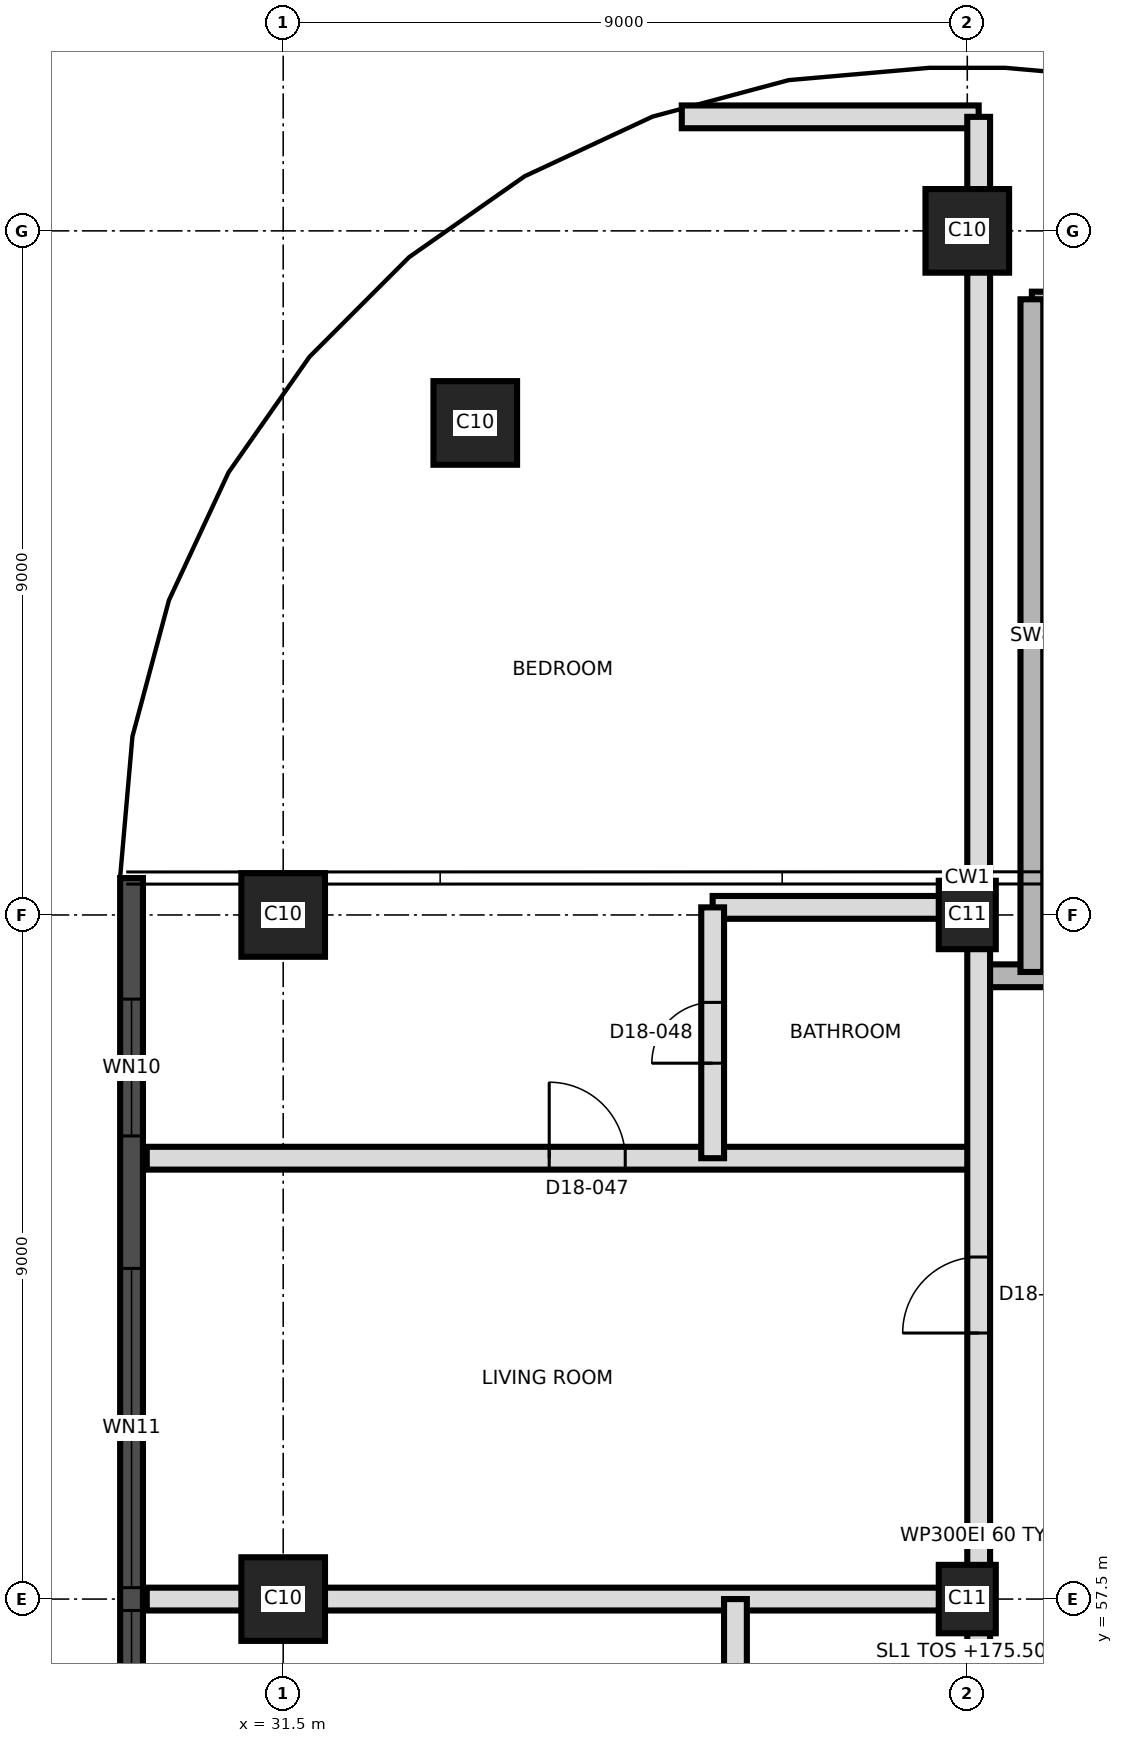
"""IFC4 building model, lengths in metres.
Left out: names, types, materials, properties, quantities, classifications, styles, units other than length and angle.
Written with IfcOpenShell. Run it as: python <this file> out.ifc"""

import sys

from ifc_helpers import new_model, si_unit, direction, frame, frame_2d, origin, origin_2d, place, context, subcontext, project, spatial, rectangle, extrude, element, fill, save


model = new_model("IFC4")
c1 = context("Model", 3, precision=1e-05, world=origin(), true_north=direction((0.0, 1.0)))
c2 = subcontext(c1, "Body", "Model", "MODEL_VIEW")
j1 = project(units=[si_unit("LENGTHUNIT", "METRE"), si_unit("PLANEANGLEUNIT", "RADIAN")], contexts=[c1])
p1 = place(None, origin())
s1 = spatial("IfcSite", under=j1, at=p1, CompositionType="ELEMENT")
p2 = place(p1, origin())
s2 = spatial("IfcBuilding", under=s1, at=p2, CompositionType="ELEMENT")
p3 = place(p2, frame((0.0, 0.0, 175.5)))
s3 = spatial("IfcBuildingStorey", under=s2, at=p3, CompositionType="ELEMENT", Elevation=175.5)
p4 = place(p3, frame((31.5, 57.5, 0.0), z_axis=(0.0, 0.0, 1.0), x_axis=(1.0, 0.0, 0.0)))
e1 = element("IfcColumn", 1, at=p4, inside=s3, PredefinedType="COLUMN", context=c2, shape_type="SweptSolid", body=[
    extrude(rectangle(XDim=1.1, YDim=1.1, at=origin_2d()), origin(), (0.0, 0.0, 1.0), 3.7),
])
p5 = place(p3, frame((40.5, 57.5, 0.0), z_axis=(0.0, 0.0, 1.0), x_axis=(0.0, 1.0, 0.0)))
e2 = element("IfcColumn", 2, at=p5, inside=s3, PredefinedType="COLUMN", context=c2, shape_type="SweptSolid", body=[
    extrude(rectangle(XDim=0.9, YDim=0.75, at=origin_2d()), origin(), (0.0, 0.0, 1.0), 3.7),
])
p6 = place(p3, frame((31.5, 66.5, 0.0), z_axis=(0.0, 0.0, 1.0), x_axis=(1.0, 0.0, 0.0)))
e3 = element("IfcColumn", 3, at=p6, inside=s3, PredefinedType="COLUMN", context=c2, shape_type="SweptSolid", body=[
    extrude(rectangle(XDim=1.1, YDim=1.1, at=origin_2d()), origin(), (0.0, 0.0, 1.0), 3.7),
])
p7 = place(p3, frame((40.5, 66.5, 0.0), z_axis=(0.0, 0.0, 1.0), x_axis=(0.0, 1.0, 0.0)))
e4 = element("IfcColumn", 4, at=p7, inside=s3, PredefinedType="COLUMN", context=c2, shape_type="SweptSolid", body=[
    extrude(rectangle(XDim=0.9, YDim=0.75, at=origin_2d()), origin(), (0.0, 0.0, 1.0), 3.7),
])
for number, where, z_axis, x_axis in (
    (5, (34.027, 72.973, 0.0), (0.0, 0.0, 1.0), (1.0, 0.0, 0.0)),
    (6, (40.5, 75.5, 0.0), (0.0, 0.0, 1.0), (1.0, 0.0, 0.0)),
):
    element("IfcColumn", number, at=place(p3, frame(where, z_axis=z_axis, x_axis=x_axis)), inside=s3, PredefinedType="COLUMN", context=c2, shape_type="SweptSolid", body=[
        extrude(rectangle(XDim=1.1, YDim=1.1, at=origin_2d()), origin(), (0.0, 0.0, 1.0), 3.7),
    ])
p8 = place(p3, frame((29.505, 66.986, 0.0), z_axis=(0.0, 0.0, 1.0), x_axis=(0.0, -1.0, 0.0)))
e7 = element("IfcWall", 7, at=p8, inside=s3, PredefinedType="SOLIDWALL", context=c2, shape_type="SweptSolid", body=[
    extrude(rectangle(XDim=32.976, YDim=0.3, at=frame_2d((16.488, 0.0))), origin(), (0.0, 0.0, 1.0), 3.4),
])
p9 = place(p8, frame((1.593, 0.0, 0.3)))
e8 = element("IfcOpeningElement", 8, at=p9, cuts=e7, PredefinedType="OPENING", context=c2, shape_type="SweptSolid", body=[
    extrude(rectangle(XDim=1.8, YDim=2.4, at=frame_2d((0.9, 1.2))), frame((0.0, 0.16, 0.0), z_axis=(0.0, -1.0, 0.0), x_axis=(1.0, 0.0, 0.0)), (0.0, 0.0, 1.0), 0.32),
])
p10 = place(p8, frame((5.136, 0.0, 0.9)))
e9 = element("IfcOpeningElement", 9, at=p10, cuts=e7, PredefinedType="OPENING", context=c2, shape_type="SweptSolid", body=[
    extrude(rectangle(XDim=4.2, YDim=1.5, at=frame_2d((2.1, 0.75))), frame((0.0, 0.16, 0.0), z_axis=(0.0, -1.0, 0.0), x_axis=(1.0, 0.0, 0.0)), (0.0, 0.0, 1.0), 0.32),
])
p11 = place(p8, frame((9.636, 0.0, 0.9)))
e10 = element("IfcOpeningElement", 10, at=p11, cuts=e7, PredefinedType="OPENING", context=c2, shape_type="SweptSolid", body=[
    extrude(rectangle(XDim=4.2, YDim=1.5, at=frame_2d((2.1, 0.75))), frame((0.0, 0.16, 0.0), z_axis=(0.0, -1.0, 0.0), x_axis=(1.0, 0.0, 0.0)), (0.0, 0.0, 1.0), 0.32),
])
p12 = place(p8, frame((14.136, 0.0, 0.9)))
e11 = element("IfcOpeningElement", 11, at=p12, cuts=e7, PredefinedType="OPENING", context=c2, shape_type="SweptSolid", body=[
    extrude(rectangle(XDim=4.2, YDim=1.5, at=frame_2d((2.1, 0.75))), frame((0.0, 0.16, 0.0), z_axis=(0.0, -1.0, 0.0), x_axis=(1.0, 0.0, 0.0)), (0.0, 0.0, 1.0), 0.32),
])
p13 = place(p8, frame((18.636, 0.0, 0.9)))
e12 = element("IfcOpeningElement", 12, at=p13, cuts=e7, PredefinedType="OPENING", context=c2, shape_type="SweptSolid", body=[
    extrude(rectangle(XDim=4.2, YDim=1.5, at=frame_2d((2.1, 0.75))), frame((0.0, 0.16, 0.0), z_axis=(0.0, -1.0, 0.0), x_axis=(1.0, 0.0, 0.0)), (0.0, 0.0, 1.0), 0.32),
])
p14 = place(p8, frame((23.136, 0.0, 0.9)))
e13 = element("IfcOpeningElement", 13, at=p14, cuts=e7, PredefinedType="OPENING", context=c2, shape_type="SweptSolid", body=[
    extrude(rectangle(XDim=4.2, YDim=1.5, at=frame_2d((2.1, 0.75))), frame((0.0, 0.16, 0.0), z_axis=(0.0, -1.0, 0.0), x_axis=(1.0, 0.0, 0.0)), (0.0, 0.0, 1.0), 0.32),
])
p15 = place(p8, frame((29.331, 0.0, 0.3)))
e14 = element("IfcOpeningElement", 14, at=p15, cuts=e7, PredefinedType="OPENING", context=c2, shape_type="SweptSolid", body=[
    extrude(rectangle(XDim=1.8, YDim=2.4, at=frame_2d((0.9, 1.2))), frame((0.0, 0.16, 0.0), z_axis=(0.0, -1.0, 0.0), x_axis=(1.0, 0.0, 0.0)), (0.0, 0.0, 1.0), 0.32),
])
p16 = place(p3, frame((29.705, 57.5, 0.0), z_axis=(0.0, 0.0, 1.0), x_axis=(1.0, 0.0, 0.0)))
e15 = element("IfcWall", 15, at=p16, inside=s3, PredefinedType="PARTITIONING", context=c2, shape_type="SweptSolid", body=[
    extrude(rectangle(XDim=10.945, YDim=0.3, at=frame_2d((5.472, 0.0))), origin(), (0.0, 0.0, 1.0), 3.4),
])
p17 = place(p3, frame((29.705, 63.3, 0.0), z_axis=(0.0, 0.0, 1.0), x_axis=(1.0, 0.0, 0.0)))
e16 = element("IfcWall", 16, at=p17, inside=s3, PredefinedType="PARTITIONING", context=c2, shape_type="SweptSolid", body=[
    extrude(rectangle(XDim=10.945, YDim=0.3, at=frame_2d((5.472, 0.0))), origin(), (0.0, 0.0, 1.0), 3.4),
])
p18 = place(p17, frame((5.295, 0.0, 0.0)))
e17 = element("IfcOpeningElement", 17, at=p18, cuts=e16, PredefinedType="OPENING", context=c2, shape_type="SweptSolid", body=[
    extrude(rectangle(XDim=1.0, YDim=2.1, at=frame_2d((0.5, 1.05))), frame((0.0, 0.16, 0.0), z_axis=(0.0, -1.0, 0.0), x_axis=(1.0, 0.0, 0.0)), (0.0, 0.0, 1.0), 0.32),
])
p19 = place(p3, frame((40.65, 65.7, 0.0), z_axis=(0.0, 0.0, 1.0), x_axis=(1.0, 0.0, 0.0)))
e18 = element("IfcWall", 18, at=p19, inside=s3, PredefinedType="SHEAR", context=c2, shape_type="SweptSolid", body=[
    extrude(rectangle(XDim=6.2, YDim=0.3, at=frame_2d((3.1, 0.0))), origin(), (0.0, 0.0, 1.0), 3.4),
])
p20 = place(p19, frame((1.1, 0.0, 0.0)))
e19 = element("IfcOpeningElement", 19, at=p20, cuts=e18, PredefinedType="OPENING", context=c2, shape_type="SweptSolid", body=[
    extrude(rectangle(XDim=1.2, YDim=2.1, at=frame_2d((0.6, 1.05))), frame((0.0, 0.16, 0.0), z_axis=(0.0, -1.0, 0.0), x_axis=(1.0, 0.0, 0.0)), (0.0, 0.0, 1.0), 0.32),
])
p21 = place(p3, frame((37.15, 66.6, 0.0), z_axis=(0.0, 0.0, 1.0), x_axis=(1.0, 0.0, 0.0)))
e20 = element("IfcWall", 20, at=p21, inside=s3, PredefinedType="PARTITIONING", context=c2, shape_type="SweptSolid", body=[
    extrude(rectangle(XDim=3.5, YDim=0.3, at=frame_2d((1.75, 0.0))), origin(), (0.0, 0.0, 1.0), 3.4),
])
p22 = place(p3, frame((41.35, 74.55, 0.0), z_axis=(0.0, 0.0, 1.0), x_axis=(1.0, 0.0, 0.0)))
e21 = element("IfcWall", 21, at=p22, inside=s3, PredefinedType="SHEAR", context=c2, shape_type="SweptSolid", body=[
    extrude(rectangle(XDim=3.0, YDim=0.3, at=frame_2d((1.5, 0.0))), origin(), (0.0, 0.0, 1.0), 3.4),
])
p23 = place(p3, frame((36.744, 77.0, 0.0), z_axis=(0.0, 0.0, 1.0), x_axis=(1.0, 0.0, 0.0)))
e22 = element("IfcWall", 22, at=p23, inside=s3, PredefinedType="PARTITIONING", context=c2, shape_type="SweptSolid", body=[
    extrude(rectangle(XDim=3.906, YDim=0.3, at=frame_2d((1.953, 0.0))), origin(), (0.0, 0.0, 1.0), 3.4),
])
p24 = place(p3, frame((37.15, 63.3, 0.0), z_axis=(0.0, 0.0, 1.0), x_axis=(0.0, 1.0, 0.0)))
e23 = element("IfcWall", 23, at=p24, inside=s3, PredefinedType="PARTITIONING", context=c2, shape_type="SweptSolid", body=[
    extrude(rectangle(XDim=3.3, YDim=0.3, at=frame_2d((1.65, 0.0))), origin(), (0.0, 0.0, 1.0), 3.4),
])
p25 = place(p24, frame((1.25, 0.0, 0.0)))
e24 = element("IfcOpeningElement", 24, at=p25, cuts=e23, PredefinedType="OPENING", context=c2, shape_type="SweptSolid", body=[
    extrude(rectangle(XDim=0.8, YDim=2.1, at=frame_2d((0.4, 1.05))), frame((0.0, 0.16, 0.0), z_axis=(0.0, -1.0, 0.0), x_axis=(1.0, 0.0, 0.0)), (0.0, 0.0, 1.0), 0.32),
])
p26 = place(p3, frame((37.45, 54.8, 0.0), z_axis=(0.0, 0.0, 1.0), x_axis=(0.0, 1.0, 0.0)))
e25 = element("IfcWall", 25, at=p26, inside=s3, PredefinedType="PARTITIONING", context=c2, shape_type="SweptSolid", body=[
    extrude(rectangle(XDim=2.7, YDim=0.3, at=frame_2d((1.35, 0.0))), origin(), (0.0, 0.0, 1.0), 3.4),
])
p27 = place(p26, frame((0.95, 0.0, 0.0)))
e26 = element("IfcOpeningElement", 26, at=p27, cuts=e25, PredefinedType="OPENING", context=c2, shape_type="SweptSolid", body=[
    extrude(rectangle(XDim=0.8, YDim=2.1, at=frame_2d((0.4, 1.05))), frame((0.0, 0.16, 0.0), z_axis=(0.0, -1.0, 0.0), x_axis=(1.0, 0.0, 0.0)), (0.0, 0.0, 1.0), 0.32),
])
p28 = place(p3, frame((40.65, 39.65, 0.0), z_axis=(0.0, 0.0, 1.0), x_axis=(0.0, 1.0, 0.0)))
e27 = element("IfcWall", 27, at=p28, inside=s3, PredefinedType="PARTITIONING", context=c2, shape_type="SweptSolid", body=[
    extrude(rectangle(XDim=37.35, YDim=0.3, at=frame_2d((18.675, 0.0))), origin(), (0.0, 0.0, 1.0), 3.4),
])
p29 = place(p28, frame((1.0, 0.0, 0.0)))
e28 = element("IfcOpeningElement", 28, at=p29, cuts=e27, PredefinedType="OPENING", context=c2, shape_type="SweptSolid", body=[
    extrude(rectangle(XDim=1.0, YDim=2.1, at=frame_2d((0.5, 1.05))), frame((0.0, 0.16, 0.0), z_axis=(0.0, -1.0, 0.0), x_axis=(1.0, 0.0, 0.0)), (0.0, 0.0, 1.0), 0.32),
])
p30 = place(p28, frame((6.85, 0.0, 0.0)))
e29 = element("IfcOpeningElement", 29, at=p30, cuts=e27, PredefinedType="OPENING", context=c2, shape_type="SweptSolid", body=[
    extrude(rectangle(XDim=1.0, YDim=2.1, at=frame_2d((0.5, 1.05))), frame((0.0, 0.16, 0.0), z_axis=(0.0, -1.0, 0.0), x_axis=(1.0, 0.0, 0.0)), (0.0, 0.0, 1.0), 0.32),
])
p31 = place(p28, frame((9.985, 0.0, 0.0)))
e30 = element("IfcOpeningElement", 30, at=p31, cuts=e27, PredefinedType="OPENING", context=c2, shape_type="SweptSolid", body=[
    extrude(rectangle(XDim=1.2, YDim=2.1, at=frame_2d((0.6, 1.05))), frame((0.0, 0.16, 0.0), z_axis=(0.0, -1.0, 0.0), x_axis=(1.0, 0.0, 0.0)), (0.0, 0.0, 1.0), 0.32),
])
p32 = place(p28, frame((13.235, 0.0, 0.0)))
e31 = element("IfcOpeningElement", 31, at=p32, cuts=e27, PredefinedType="OPENING", context=c2, shape_type="SweptSolid", body=[
    extrude(rectangle(XDim=1.0, YDim=2.1, at=frame_2d((0.5, 1.05))), frame((0.0, 0.16, 0.0), z_axis=(0.0, -1.0, 0.0), x_axis=(1.0, 0.0, 0.0)), (0.0, 0.0, 1.0), 0.32),
])
p33 = place(p28, frame((21.35, 0.0, 0.0)))
e32 = element("IfcOpeningElement", 32, at=p33, cuts=e27, PredefinedType="OPENING", context=c2, shape_type="SweptSolid", body=[
    extrude(rectangle(XDim=1.0, YDim=2.4, at=frame_2d((0.5, 1.2))), frame((0.0, 0.16, 0.0), z_axis=(0.0, -1.0, 0.0), x_axis=(1.0, 0.0, 0.0)), (0.0, 0.0, 1.0), 0.32),
])
p34 = place(p3, frame((41.35, 65.75, 0.0), z_axis=(0.0, 0.0, 1.0), x_axis=(0.0, 1.0, 0.0)))
e33 = element("IfcWall", 33, at=p34, inside=s3, PredefinedType="SHEAR", context=c2, shape_type="SweptSolid", body=[
    extrude(rectangle(XDim=8.85, YDim=0.3, at=frame_2d((4.425, 0.0))), origin(), (0.0, 0.0, 1.0), 3.4),
])
p35 = place(p9, origin())
e34 = element("IfcWindow", 34, at=p35, inside=s3, PartitioningType="SINGLE_PANEL", PredefinedType="WINDOW", context=c2, shape_type="SweptSolid", body=[
    extrude(rectangle(XDim=1.8, YDim=2.4, at=frame_2d((0.9, 1.2))), frame((0.0, 0.03, 0.0), z_axis=(0.0, -1.0, 0.0), x_axis=(1.0, 0.0, 0.0)), (0.0, 0.0, 1.0), 0.06),
])
fill(e8, e34)
p36 = place(p10, origin())
e35 = element("IfcWindow", 35, at=p36, inside=s3, PartitioningType="SINGLE_PANEL", PredefinedType="WINDOW", context=c2, shape_type="SweptSolid", body=[
    extrude(rectangle(XDim=4.2, YDim=1.5, at=frame_2d((2.1, 0.75))), frame((0.0, 0.03, 0.0), z_axis=(0.0, -1.0, 0.0), x_axis=(1.0, 0.0, 0.0)), (0.0, 0.0, 1.0), 0.06),
])
fill(e9, e35)
p37 = place(p11, origin())
e36 = element("IfcWindow", 36, at=p37, inside=s3, PartitioningType="SINGLE_PANEL", PredefinedType="WINDOW", context=c2, shape_type="SweptSolid", body=[
    extrude(rectangle(XDim=4.2, YDim=1.5, at=frame_2d((2.1, 0.75))), frame((0.0, 0.03, 0.0), z_axis=(0.0, -1.0, 0.0), x_axis=(1.0, 0.0, 0.0)), (0.0, 0.0, 1.0), 0.06),
])
fill(e10, e36)
p38 = place(p33, origin())
e37 = element("IfcDoor", 37, at=p38, inside=s3, OperationType="SINGLE_SWING_LEFT", PredefinedType="DOOR", context=c2, shape_type="SweptSolid", body=[
    extrude(rectangle(XDim=1.0, YDim=2.4, at=frame_2d((0.5, 1.2))), frame((0.0, 0.025, 0.0), z_axis=(0.0, -1.0, 0.0), x_axis=(1.0, 0.0, 0.0)), (0.0, 0.0, 1.0), 0.05),
])
fill(e32, e37)
p39 = place(p18, origin())
e38 = element("IfcDoor", 38, at=p39, inside=s3, OperationType="SINGLE_SWING_RIGHT", PredefinedType="DOOR", context=c2, shape_type="SweptSolid", body=[
    extrude(rectangle(XDim=1.0, YDim=2.1, at=frame_2d((0.5, 1.05))), frame((0.0, 0.025, 0.0), z_axis=(0.0, -1.0, 0.0), x_axis=(1.0, 0.0, 0.0)), (0.0, 0.0, 1.0), 0.05),
])
fill(e17, e38)
p40 = place(p25, origin())
e39 = element("IfcDoor", 39, at=p40, inside=s3, OperationType="SINGLE_SWING_LEFT", PredefinedType="DOOR", context=c2, shape_type="SweptSolid", body=[
    extrude(rectangle(XDim=0.8, YDim=2.1, at=frame_2d((0.4, 1.05))), frame((0.0, 0.025, 0.0), z_axis=(0.0, -1.0, 0.0), x_axis=(1.0, 0.0, 0.0)), (0.0, 0.0, 1.0), 0.05),
])
fill(e24, e39)
save(model, sys.argv[1])
